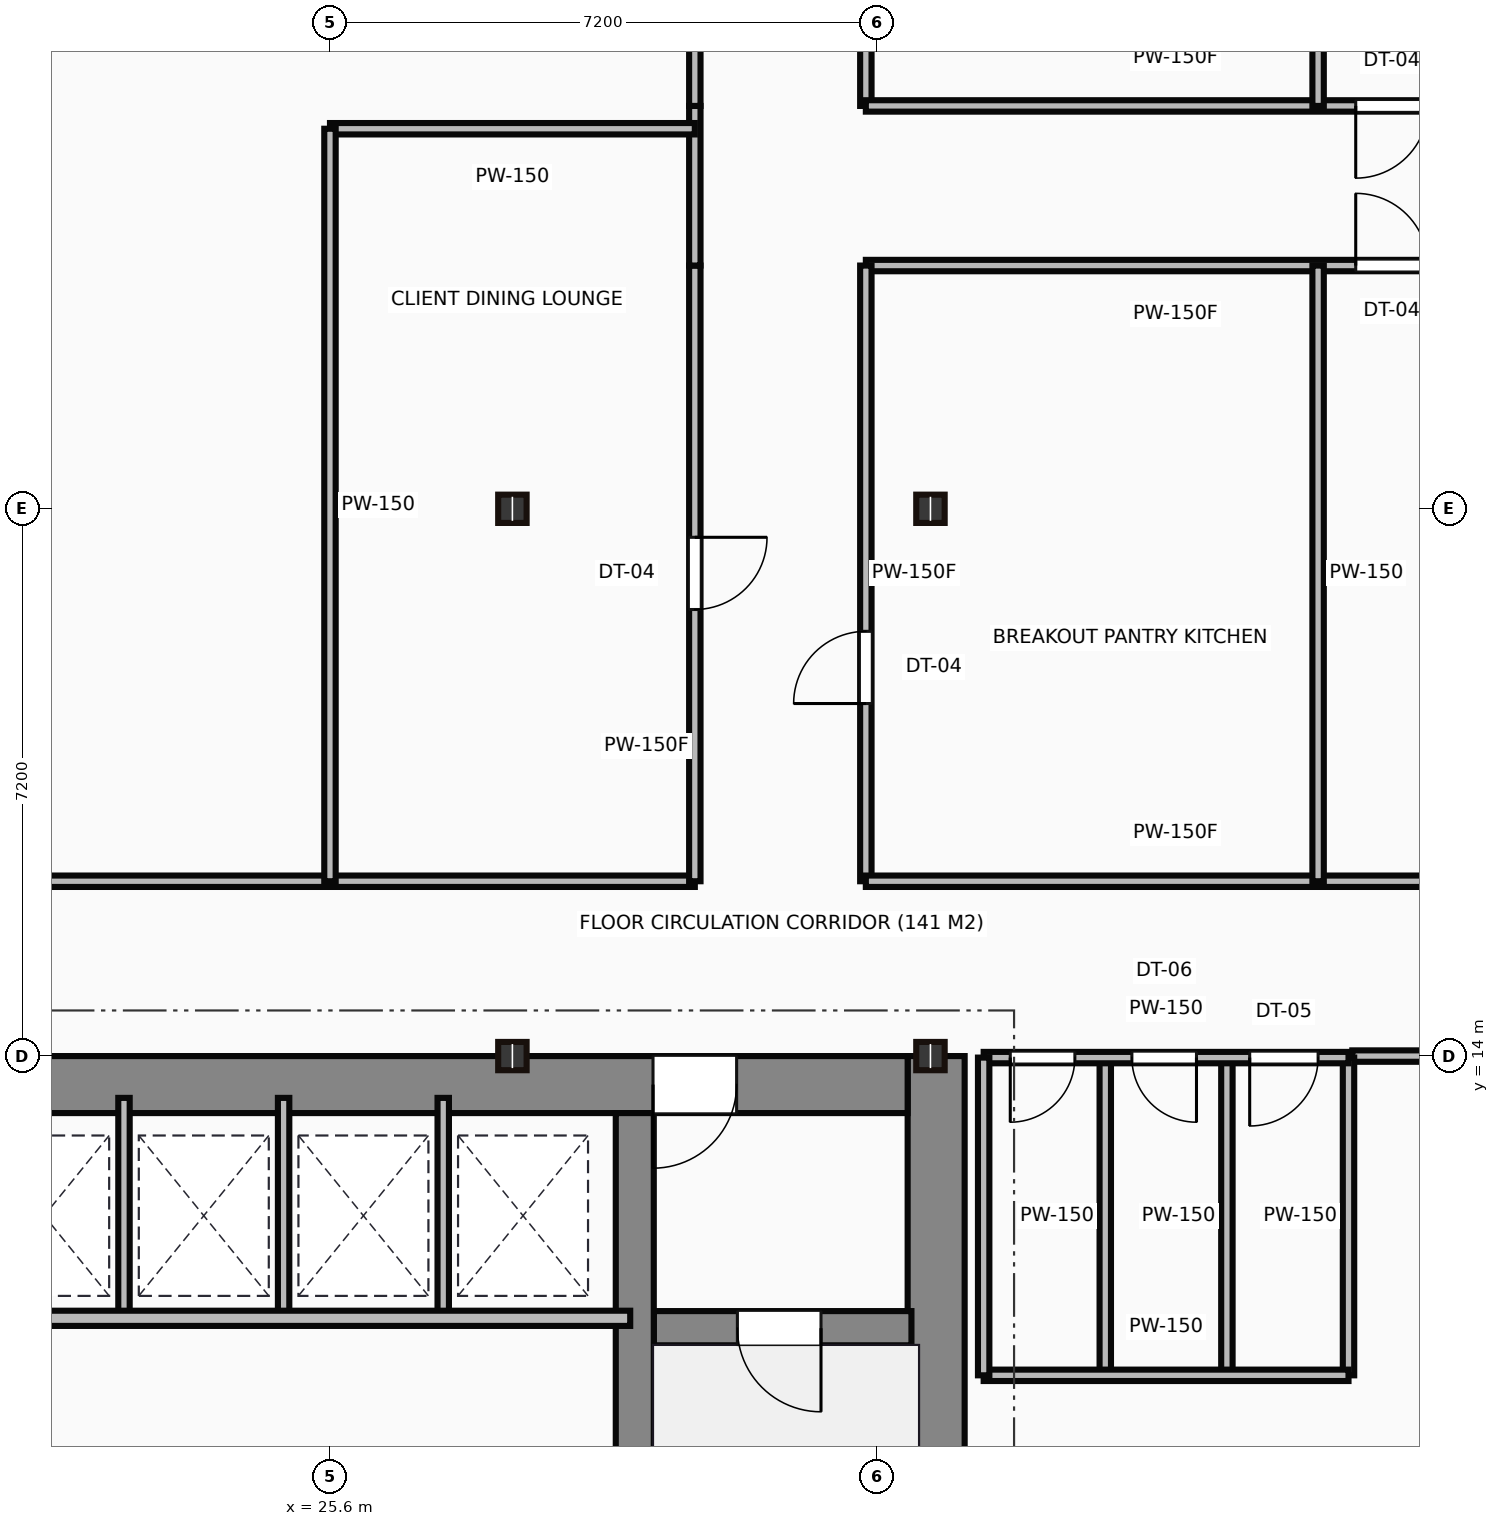
"""IFC4 building model, lengths in metres.
Left out: names, types, materials, properties, quantities, classifications, styles, units other than length and angle.
Written with IfcOpenShell. Run it as: python <this file> out.ifc"""

import sys

from ifc_helpers import new_model, si_unit, direction, frame, frame_2d, origin, origin_2d, place, context, subcontext, project, spatial, rectangle, i_section, extrude, source, transform, mapped, element, fill, save


model = new_model("IFC4")
c1 = context("Model", 3, precision=1e-05, world=origin(), true_north=direction((0.0, 1.0)))
c2 = subcontext(c1, "Body", "Model", "MODEL_VIEW")
j1 = project(units=[si_unit("LENGTHUNIT", "METRE"), si_unit("PLANEANGLEUNIT", "RADIAN")], contexts=[c1])
p1 = place(None, origin())
s1 = spatial("IfcSite", under=j1, at=p1, CompositionType="ELEMENT")
p2 = place(p1, origin())
s2 = spatial("IfcBuilding", under=s1, at=p2, CompositionType="ELEMENT")
p3 = place(p2, frame((0.0, 0.0, 166.15)))
s3 = spatial("IfcBuildingStorey", under=s2, at=p3, CompositionType="ELEMENT", Elevation=166.15)
m1 = source(origin(), c2, "Body", "SweptSolid", [
    extrude(rectangle(XDim=13.1, YDim=0.75, at=frame_2d((6.55, 0.0))), origin(), (0.0, 0.0, 1.0), 3.65),
])
p4 = place(p3, frame((33.575, 0.9, 0.0), z_axis=(0.0, 0.0, 1.0), x_axis=(0.0, 1.0, 0.0)))
e1 = element("IfcWall", 1, at=p4, inside=s3, PredefinedType="SHEAR", context=c2, shape_type="MappedRepresentation", body=[
    mapped(m1, transform((0.0, 0.0, 0.0))),
])
m2 = source(origin(), c2, "Body", "SweptSolid", [
    extrude(rectangle(XDim=12.6, YDim=0.75, at=frame_2d((6.3, 0.0))), origin(), (0.0, 0.0, 1.0), 3.65),
])
p5 = place(p3, frame((20.6, 13.625, 0.0), z_axis=(0.0, 0.0, 1.0), x_axis=(1.0, 0.0, 0.0)))
e2 = element("IfcWall", 2, at=p5, inside=s3, PredefinedType="SHEAR", context=c2, shape_type="MappedRepresentation", body=[
    mapped(m2, transform((0.0, 0.0, 0.0))),
])
p6 = place(p5, frame((9.25, 0.0, 0.0)))
e3 = element("IfcOpeningElement", 3, at=p6, cuts=e2, PredefinedType="OPENING", context=c2, shape_type="SweptSolid", body=[
    extrude(rectangle(XDim=1.1, YDim=2.15, at=frame_2d((0.55, 1.075))), frame((0.0, 0.385, 0.0), z_axis=(0.0, -1.0, 0.0), x_axis=(1.0, 0.0, 0.0)), (0.0, 0.0, 1.0), 0.77),
])
m3 = source(origin(), c2, "Body", "SweptSolid", [
    extrude(rectangle(XDim=12.35, YDim=0.5, at=frame_2d((6.175, 0.0))), origin(), (0.0, 0.0, 1.0), 3.65),
])
p7 = place(p3, frame((29.61, 0.9, 0.0), z_axis=(0.0, 0.0, 1.0), x_axis=(0.0, 1.0, 0.0)))
e4 = element("IfcWall", 4, at=p7, inside=s3, PredefinedType="SHEAR", context=c2, shape_type="MappedRepresentation", body=[
    mapped(m3, transform((0.0, 0.0, 0.0))),
])
m4 = source(origin(), c2, "Body", "SweptSolid", [
    extrude(rectangle(XDim=3.39, YDim=0.45, at=frame_2d((1.695, 0.0))), origin(), (0.0, 0.0, 1.0), 3.65),
])
p8 = place(p3, frame((29.86, 10.42, 0.0), z_axis=(0.0, 0.0, 1.0), x_axis=(1.0, 0.0, 0.0)))
e5 = element("IfcWall", 5, at=p8, inside=s3, PredefinedType="SHEAR", context=c2, shape_type="MappedRepresentation", body=[
    mapped(m4, transform((0.0, 0.0, 0.0))),
])
p9 = place(p8, frame((1.1, 0.0, 0.0)))
e6 = element("IfcOpeningElement", 6, at=p9, cuts=e5, PredefinedType="OPENING", context=c2, shape_type="SweptSolid", body=[
    extrude(rectangle(XDim=1.1, YDim=2.15, at=frame_2d((0.55, 1.075))), frame((0.0, 0.235, 0.0), z_axis=(0.0, -1.0, 0.0), x_axis=(1.0, 0.0, 0.0)), (0.0, 0.0, 1.0), 0.47),
])
m5 = source(origin(), c2, "Body", "SweptSolid", [
    extrude(i_section(OverallWidth=0.374, OverallDepth=0.372, WebThickness=0.016, FlangeThickness=0.026, at=origin_2d()), origin(), (0.0, 0.0, 1.0), 3.65),
])
for number, where, z_axis, x_axis in (
    (7, (28.0, 14.0, 0.0), (0.0, 0.0, 1.0), (1.0, 0.0, 0.0)),
    (8, (28.0, 21.2, 0.0), (0.0, 0.0, 1.0), (1.0, 0.0, 0.0)),
    (9, (33.5, 14.0, 0.0), (0.0, 0.0, 1.0), (1.0, 0.0, 0.0)),
    (10, (33.5, 21.2, 0.0), (0.0, 0.0, 1.0), (1.0, 0.0, 0.0)),
):
    element("IfcColumn", number, at=place(p3, frame(where, z_axis=z_axis, x_axis=x_axis)), inside=s3, PredefinedType="COLUMN", context=c2, shape_type="MappedRepresentation", body=[
        mapped(m5, transform((0.0, 0.0, 0.0))),
    ])
m6 = source(origin(), c2, "Body", "SweptSolid", [
    extrude(rectangle(XDim=8.8, YDim=0.2, at=frame_2d((4.4, 0.0))), origin(), (0.0, 0.0, 1.0), 3.4),
])
p10 = place(p3, frame((20.75, 10.55, 0.0), z_axis=(0.0, 0.0, 1.0), x_axis=(1.0, 0.0, 0.0)))
e11 = element("IfcWall", 11, at=p10, inside=s3, PredefinedType="PARTITIONING", context=c2, shape_type="MappedRepresentation", body=[
    mapped(m6, transform((0.0, 0.0, 0.0))),
])
m7 = source(origin(), c2, "Body", "SweptSolid", [
    extrude(rectangle(XDim=2.85, YDim=0.15, at=frame_2d((1.425, 0.0))), origin(), (0.0, 0.0, 1.0), 3.4),
])
for number, where, z_axis, x_axis in (
    (12, (22.89, 10.6, 0.0), (0.0, 0.0, 1.0), (0.0, 1.0, 0.0)),
    (13, (24.99, 10.6, 0.0), (0.0, 0.0, 1.0), (0.0, 1.0, 0.0)),
    (14, (27.09, 10.6, 0.0), (0.0, 0.0, 1.0), (0.0, 1.0, 0.0)),
):
    element("IfcWall", number, at=place(p3, frame(where, z_axis=z_axis, x_axis=x_axis)), inside=s3, PredefinedType="PARTITIONING", context=c2, shape_type="MappedRepresentation", body=[
        mapped(m7, transform((0.0, 0.0, 0.0))),
    ])
m8 = source(origin(), c2, "Body", "SweptSolid", [
    extrude(rectangle(XDim=4.8, YDim=0.15, at=frame_2d((2.4, 0.0))), origin(), (0.0, 0.0, 1.0), 2.76),
])
p11 = place(p3, frame((34.2, 13.98, 0.0), z_axis=(0.0, 0.0, 1.0), x_axis=(1.0, 0.0, 0.0)))
e15 = element("IfcWall", 15, at=p11, inside=s3, PredefinedType="PARTITIONING", context=c2, shape_type="MappedRepresentation", body=[
    mapped(m8, transform((0.0, 0.0, 0.0))),
])
p12 = place(p11, frame((0.35, 0.0, 0.0)))
e16 = element("IfcOpeningElement", 16, at=p12, cuts=e15, PredefinedType="OPENING", context=c2, shape_type="SweptSolid", body=[
    extrude(rectangle(XDim=0.85, YDim=2.1, at=frame_2d((0.425, 1.05))), frame((0.0, 0.085, 0.0), z_axis=(0.0, -1.0, 0.0), x_axis=(1.0, 0.0, 0.0)), (0.0, 0.0, 1.0), 0.17),
])
p13 = place(p11, frame((1.95, 0.0, 0.0)))
e17 = element("IfcOpeningElement", 17, at=p13, cuts=e15, PredefinedType="OPENING", context=c2, shape_type="SweptSolid", body=[
    extrude(rectangle(XDim=0.85, YDim=2.1, at=frame_2d((0.425, 1.05))), frame((0.0, 0.085, 0.0), z_axis=(0.0, -1.0, 0.0), x_axis=(1.0, 0.0, 0.0)), (0.0, 0.0, 1.0), 0.17),
])
p14 = place(p11, frame((3.5, 0.0, 0.0)))
e18 = element("IfcOpeningElement", 18, at=p14, cuts=e15, PredefinedType="OPENING", context=c2, shape_type="SweptSolid", body=[
    extrude(rectangle(XDim=0.9, YDim=2.1, at=frame_2d((0.45, 1.05))), frame((0.0, 0.085, 0.0), z_axis=(0.0, -1.0, 0.0), x_axis=(1.0, 0.0, 0.0)), (0.0, 0.0, 1.0), 0.17),
])
m9 = source(origin(), c2, "Body", "SweptSolid", [
    extrude(rectangle(XDim=4.8, YDim=0.15, at=frame_2d((2.4, 0.0))), origin(), (0.0, 0.0, 1.0), 3.4),
])
p15 = place(p3, frame((34.2, 9.8, 0.0), z_axis=(0.0, 0.0, 1.0), x_axis=(1.0, 0.0, 0.0)))
e19 = element("IfcWall", 19, at=p15, inside=s3, PredefinedType="PARTITIONING", context=c2, shape_type="MappedRepresentation", body=[
    mapped(m9, transform((0.0, 0.0, 0.0))),
])
m10 = source(origin(), c2, "Body", "SweptSolid", [
    extrude(rectangle(XDim=4.18, YDim=0.15, at=frame_2d((2.09, 0.0))), origin(), (0.0, 0.0, 1.0), 3.4),
])
for number, where, z_axis, x_axis in (
    (20, (39.0, 9.8, 0.0), (0.0, 0.0, 1.0), (0.0, 1.0, 0.0)),
    (21, (34.2, 9.8, 0.0), (0.0, 0.0, 1.0), (0.0, 1.0, 0.0)),
    (22, (35.8, 9.8, 0.0), (0.0, 0.0, 1.0), (0.0, 1.0, 0.0)),
    (23, (37.4, 9.8, 0.0), (0.0, 0.0, 1.0), (0.0, 1.0, 0.0)),
):
    element("IfcWall", number, at=place(p3, frame(where, z_axis=z_axis, x_axis=x_axis)), inside=s3, PredefinedType="PARTITIONING", context=c2, shape_type="MappedRepresentation", body=[
        mapped(m10, transform((0.0, 0.0, 0.0))),
    ])
m11 = source(origin(), c2, "Body", "SweptSolid", [
    extrude(rectangle(XDim=25.8, YDim=0.15, at=frame_2d((12.9, 0.0))), origin(), (0.0, 0.0, 1.0), 3.4),
])
p16 = place(p3, frame((4.6, 16.3, 0.0), z_axis=(0.0, 0.0, 1.0), x_axis=(1.0, 0.0, 0.0)))
e24 = element("IfcWall", 24, at=p16, inside=s3, PredefinedType="PARTITIONING", context=c2, shape_type="MappedRepresentation", body=[
    mapped(m11, transform((0.0, 0.0, 0.0))),
])
p17 = place(p16, frame((3.555, 0.0, 0.0)))
e25 = element("IfcOpeningElement", 25, at=p17, cuts=e24, PredefinedType="OPENING", context=c2, shape_type="SweptSolid", body=[
    extrude(rectangle(XDim=0.95, YDim=2.15, at=frame_2d((0.475, 1.075))), frame((0.0, 0.085, 0.0), z_axis=(0.0, -1.0, 0.0), x_axis=(1.0, 0.0, 0.0)), (0.0, 0.0, 1.0), 0.17),
])
p18 = place(p16, frame((13.925, 0.0, 0.0)))
e26 = element("IfcOpeningElement", 26, at=p18, cuts=e24, PredefinedType="OPENING", context=c2, shape_type="SweptSolid", body=[
    extrude(rectangle(XDim=0.95, YDim=2.15, at=frame_2d((0.475, 1.075))), frame((0.0, 0.085, 0.0), z_axis=(0.0, -1.0, 0.0), x_axis=(1.0, 0.0, 0.0)), (0.0, 0.0, 1.0), 0.17),
])
m12 = source(origin(), c2, "Body", "SweptSolid", [
    extrude(rectangle(XDim=8.1, YDim=0.15, at=frame_2d((4.05, 0.0))), origin(), (0.0, 0.0, 1.0), 3.4),
])
p19 = place(p3, frame((30.4, 16.3, 0.0), z_axis=(0.0, 0.0, 1.0), x_axis=(0.0, 1.0, 0.0)))
e27 = element("IfcWall", 27, at=p19, inside=s3, PredefinedType="PARTITIONING", context=c2, shape_type="MappedRepresentation", body=[
    mapped(m12, transform((0.0, 0.0, 0.0))),
])
p20 = place(p19, frame((3.575, 0.0, 0.0)))
e28 = element("IfcOpeningElement", 28, at=p20, cuts=e27, PredefinedType="OPENING", context=c2, shape_type="SweptSolid", body=[
    extrude(rectangle(XDim=0.95, YDim=2.15, at=frame_2d((0.475, 1.075))), frame((0.0, 0.085, 0.0), z_axis=(0.0, -1.0, 0.0), x_axis=(1.0, 0.0, 0.0)), (0.0, 0.0, 1.0), 0.17),
])
m13 = source(origin(), c2, "Body", "SweptSolid", [
    extrude(rectangle(XDim=2.1, YDim=0.15, at=frame_2d((1.05, 0.0))), origin(), (0.0, 0.0, 1.0), 3.4),
])
p21 = place(p3, frame((30.4, 24.4, 0.0), z_axis=(0.0, 0.0, 1.0), x_axis=(0.0, 1.0, 0.0)))
e29 = element("IfcWall", 29, at=p21, inside=s3, PredefinedType="PARTITIONING", context=c2, shape_type="MappedRepresentation", body=[
    mapped(m13, transform((0.0, 0.0, 0.0))),
])
m14 = source(origin(), c2, "Body", "SweptSolid", [
    extrude(rectangle(XDim=8.0, YDim=0.15, at=frame_2d((4.0, 0.0))), origin(), (0.0, 0.0, 1.0), 3.4),
])
p22 = place(p3, frame((30.4, 26.5, 0.0), z_axis=(0.0, 0.0, 1.0), x_axis=(0.0, 1.0, 0.0)))
e30 = element("IfcWall", 30, at=p22, inside=s3, PredefinedType="PARTITIONING", context=c2, shape_type="MappedRepresentation", body=[
    mapped(m14, transform((0.0, 0.0, 0.0))),
])
p23 = place(p3, frame((32.65, 34.5, 0.0), z_axis=(0.0, 0.0, 1.0), x_axis=(0.0, -1.0, 0.0)))
e31 = element("IfcWall", 31, at=p23, inside=s3, PredefinedType="PARTITIONING", context=c2, shape_type="MappedRepresentation", body=[
    mapped(m14, transform((0.0, 0.0, 0.0))),
])
p24 = place(p23, frame((3.745, 0.0, 0.0)))
e32 = element("IfcOpeningElement", 32, at=p24, cuts=e31, PredefinedType="OPENING", context=c2, shape_type="SweptSolid", body=[
    extrude(rectangle(XDim=0.95, YDim=2.15, at=frame_2d((0.475, 1.075))), frame((0.0, 0.085, 0.0), z_axis=(0.0, -1.0, 0.0), x_axis=(1.0, 0.0, 0.0)), (0.0, 0.0, 1.0), 0.17),
])
m15 = source(origin(), c2, "Body", "SweptSolid", [
    extrude(rectangle(XDim=8.15, YDim=0.15, at=frame_2d((4.075, 0.0))), origin(), (0.0, 0.0, 1.0), 3.4),
])
p25 = place(p3, frame((32.65, 26.5, 0.0), z_axis=(0.0, 0.0, 1.0), x_axis=(1.0, 0.0, 0.0)))
e33 = element("IfcWall", 33, at=p25, inside=s3, PredefinedType="PARTITIONING", context=c2, shape_type="MappedRepresentation", body=[
    mapped(m15, transform((0.0, 0.0, 0.0))),
])
p26 = place(p25, frame((6.445, 0.0, 0.0)))
e34 = element("IfcOpeningElement", 34, at=p26, cuts=e33, PredefinedType="OPENING", context=c2, shape_type="SweptSolid", body=[
    extrude(rectangle(XDim=0.95, YDim=2.15, at=frame_2d((0.475, 1.075))), frame((0.0, 0.085, 0.0), z_axis=(0.0, -1.0, 0.0), x_axis=(1.0, 0.0, 0.0)), (0.0, 0.0, 1.0), 0.17),
])
p27 = place(p3, frame((40.8, 24.4, 0.0), z_axis=(0.0, 0.0, 1.0), x_axis=(-1.0, 0.0, 0.0)))
e35 = element("IfcWall", 35, at=p27, inside=s3, PredefinedType="PARTITIONING", context=c2, shape_type="MappedRepresentation", body=[
    mapped(m15, transform((0.0, 0.0, 0.0))),
])
p28 = place(p27, frame((0.755, 0.0, 0.0)))
e36 = element("IfcOpeningElement", 36, at=p28, cuts=e35, PredefinedType="OPENING", context=c2, shape_type="SweptSolid", body=[
    extrude(rectangle(XDim=0.95, YDim=2.15, at=frame_2d((0.475, 1.075))), frame((0.0, 0.085, 0.0), z_axis=(0.0, -1.0, 0.0), x_axis=(1.0, 0.0, 0.0)), (0.0, 0.0, 1.0), 0.17),
])
p29 = place(p3, frame((32.65, 24.4, 0.0), z_axis=(0.0, 0.0, 1.0), x_axis=(0.0, -1.0, 0.0)))
e37 = element("IfcWall", 37, at=p29, inside=s3, PredefinedType="PARTITIONING", context=c2, shape_type="MappedRepresentation", body=[
    mapped(m12, transform((0.0, 0.0, 0.0))),
])
p30 = place(p29, frame((4.812, 0.0, 0.0)))
e38 = element("IfcOpeningElement", 38, at=p30, cuts=e37, PredefinedType="OPENING", context=c2, shape_type="SweptSolid", body=[
    extrude(rectangle(XDim=0.95, YDim=2.15, at=frame_2d((0.475, 1.075))), frame((0.0, 0.085, 0.0), z_axis=(0.0, -1.0, 0.0), x_axis=(1.0, 0.0, 0.0)), (0.0, 0.0, 1.0), 0.17),
])
p31 = place(p3, frame((32.65, 16.3, 0.0), z_axis=(0.0, 0.0, 1.0), x_axis=(1.0, 0.0, 0.0)))
e39 = element("IfcWall", 39, at=p31, inside=s3, PredefinedType="PARTITIONING", context=c2, shape_type="MappedRepresentation", body=[
    mapped(m15, transform((0.0, 0.0, 0.0))),
])
m16 = source(origin(), c2, "Body", "SweptSolid", [
    extrude(rectangle(XDim=1.75, YDim=0.15, at=frame_2d((0.875, 0.0))), origin(), (0.0, 0.0, 1.0), 2.76),
])
p32 = place(p3, frame((40.8, 14.0, 0.0), z_axis=(0.0, 0.0, 1.0), x_axis=(-1.0, 0.0, 0.0)))
e40 = element("IfcWall", 40, at=p32, inside=s3, PredefinedType="PARTITIONING", context=c2, shape_type="MappedRepresentation", body=[
    mapped(m16, transform((0.0, 0.0, 0.0))),
])
m17 = source(origin(), c2, "Body", "SweptSolid", [
    extrude(rectangle(XDim=4.8, YDim=0.15, at=frame_2d((2.4, 0.0))), origin(), (0.0, 0.0, 1.0), 3.4),
])
p33 = place(p3, frame((30.4, 26.2, 0.0), z_axis=(0.0, 0.0, 1.0), x_axis=(-1.0, 0.0, 0.0)))
e41 = element("IfcWall", 41, at=p33, inside=s3, PredefinedType="PARTITIONING", context=c2, shape_type="MappedRepresentation", body=[
    mapped(m17, transform((0.0, 0.0, 0.0))),
])
m18 = source(origin(), c2, "Body", "SweptSolid", [
    extrude(rectangle(XDim=9.9, YDim=0.15, at=frame_2d((4.95, 0.0))), origin(), (0.0, 0.0, 1.0), 3.4),
])
p34 = place(p3, frame((25.6, 26.2, 0.0), z_axis=(0.0, 0.0, 1.0), x_axis=(0.0, -1.0, 0.0)))
e42 = element("IfcWall", 42, at=p34, inside=s3, PredefinedType="PARTITIONING", context=c2, shape_type="MappedRepresentation", body=[
    mapped(m18, transform((0.0, 0.0, 0.0))),
])
p35 = place(p3, frame((38.6, 24.4, 0.0), z_axis=(0.0, 0.0, 1.0), x_axis=(0.0, -1.0, 0.0)))
e43 = element("IfcWall", 43, at=p35, inside=s3, PredefinedType="PARTITIONING", context=c2, shape_type="MappedRepresentation", body=[
    mapped(m12, transform((0.0, 0.0, 0.0))),
])
m19 = source(origin(), c2, "Body", "SweptSolid", [
    extrude(rectangle(XDim=7.3, YDim=0.15, at=frame_2d((3.65, 0.0))), origin(), (0.0, 0.0, 1.0), 3.4),
])
p36 = place(p3, frame((38.6, 33.8, 0.0), z_axis=(0.0, 0.0, 1.0), x_axis=(0.0, -1.0, 0.0)))
e44 = element("IfcWall", 44, at=p36, inside=s3, PredefinedType="PARTITIONING", context=c2, shape_type="MappedRepresentation", body=[
    mapped(m19, transform((0.0, 0.0, 0.0))),
])
m20 = source(origin(), c2, "Body", "SweptSolid", [
    extrude(rectangle(XDim=1.1, YDim=2.15, at=frame_2d((0.55, 1.075))), frame((0.0, 0.025, 0.0), z_axis=(0.0, -1.0, 0.0), x_axis=(1.0, 0.0, 0.0)), (0.0, 0.0, 1.0), 0.05),
])
p37 = place(p9, frame((1.1, 0.0, 0.0), z_axis=(0.0, 0.0, 1.0), x_axis=(-1.0, 0.0, 0.0)))
e45 = element("IfcDoor", 45, at=p37, inside=s3, OperationType="SINGLE_SWING_RIGHT", PredefinedType="DOOR", context=c2, shape_type="MappedRepresentation", body=[
    mapped(m20, transform((0.0, 0.0, 0.0))),
])
fill(e6, e45)
p38 = place(p6, origin())
e46 = element("IfcDoor", 46, at=p38, inside=s3, OperationType="SINGLE_SWING_LEFT", PredefinedType="DOOR", context=c2, shape_type="MappedRepresentation", body=[
    mapped(m20, transform((0.0, 0.0, 0.0))),
])
fill(e3, e46)
m21 = source(origin(), c2, "Body", "SweptSolid", [
    extrude(rectangle(XDim=0.85, YDim=2.1, at=frame_2d((0.425, 1.05))), frame((0.0, 0.025, 0.0), z_axis=(0.0, -1.0, 0.0), x_axis=(1.0, 0.0, 0.0)), (0.0, 0.0, 1.0), 0.05),
])
p39 = place(p12, frame((0.85, 0.0, 0.0), z_axis=(0.0, 0.0, 1.0), x_axis=(-1.0, 0.0, 0.0)))
e47 = element("IfcDoor", 47, at=p39, inside=s3, OperationType="SINGLE_SWING_LEFT", PredefinedType="DOOR", context=c2, shape_type="MappedRepresentation", body=[
    mapped(m21, transform((0.0, 0.0, 0.0))),
])
fill(e16, e47)
p40 = place(p13, frame((0.85, 0.0, 0.0), z_axis=(0.0, 0.0, 1.0), x_axis=(-1.0, 0.0, 0.0)))
e48 = element("IfcDoor", 48, at=p40, inside=s3, OperationType="SINGLE_SWING_RIGHT", PredefinedType="DOOR", context=c2, shape_type="MappedRepresentation", body=[
    mapped(m21, transform((0.0, 0.0, 0.0))),
])
fill(e17, e48)
m22 = source(origin(), c2, "Body", "SweptSolid", [
    extrude(rectangle(XDim=0.9, YDim=2.1, at=frame_2d((0.45, 1.05))), frame((0.0, 0.025, 0.0), z_axis=(0.0, -1.0, 0.0), x_axis=(1.0, 0.0, 0.0)), (0.0, 0.0, 1.0), 0.05),
])
p41 = place(p14, frame((0.9, 0.0, 0.0), z_axis=(0.0, 0.0, 1.0), x_axis=(-1.0, 0.0, 0.0)))
e49 = element("IfcDoor", 49, at=p41, inside=s3, OperationType="SINGLE_SWING_LEFT", PredefinedType="DOOR", context=c2, shape_type="MappedRepresentation", body=[
    mapped(m22, transform((0.0, 0.0, 0.0))),
])
fill(e18, e49)
m23 = source(origin(), c2, "Body", "SweptSolid", [
    extrude(rectangle(XDim=0.95, YDim=2.15, at=frame_2d((0.475, 1.075))), frame((0.0, 0.025, 0.0), z_axis=(0.0, -1.0, 0.0), x_axis=(1.0, 0.0, 0.0)), (0.0, 0.0, 1.0), 0.05),
])
p42 = place(p20, origin())
e50 = element("IfcDoor", 50, at=p42, inside=s3, OperationType="SINGLE_SWING_RIGHT", PredefinedType="DOOR", context=c2, shape_type="MappedRepresentation", body=[
    mapped(m23, transform((0.0, 0.0, 0.0))),
])
fill(e28, e50)
p43 = place(p30, origin())
e51 = element("IfcDoor", 51, at=p43, inside=s3, OperationType="SINGLE_SWING_RIGHT", PredefinedType="DOOR", context=c2, shape_type="MappedRepresentation", body=[
    mapped(m23, transform((0.0, 0.0, 0.0))),
])
fill(e38, e51)
p44 = place(p28, origin())
e52 = element("IfcDoor", 52, at=p44, inside=s3, OperationType="SINGLE_SWING_RIGHT", PredefinedType="DOOR", context=c2, shape_type="MappedRepresentation", body=[
    mapped(m23, transform((0.0, 0.0, 0.0))),
])
fill(e36, e52)
p45 = place(p26, origin())
e53 = element("IfcDoor", 53, at=p45, inside=s3, OperationType="SINGLE_SWING_LEFT", PredefinedType="DOOR", context=c2, shape_type="MappedRepresentation", body=[
    mapped(m23, transform((0.0, 0.0, 0.0))),
])
fill(e34, e53)
save(model, sys.argv[1])
